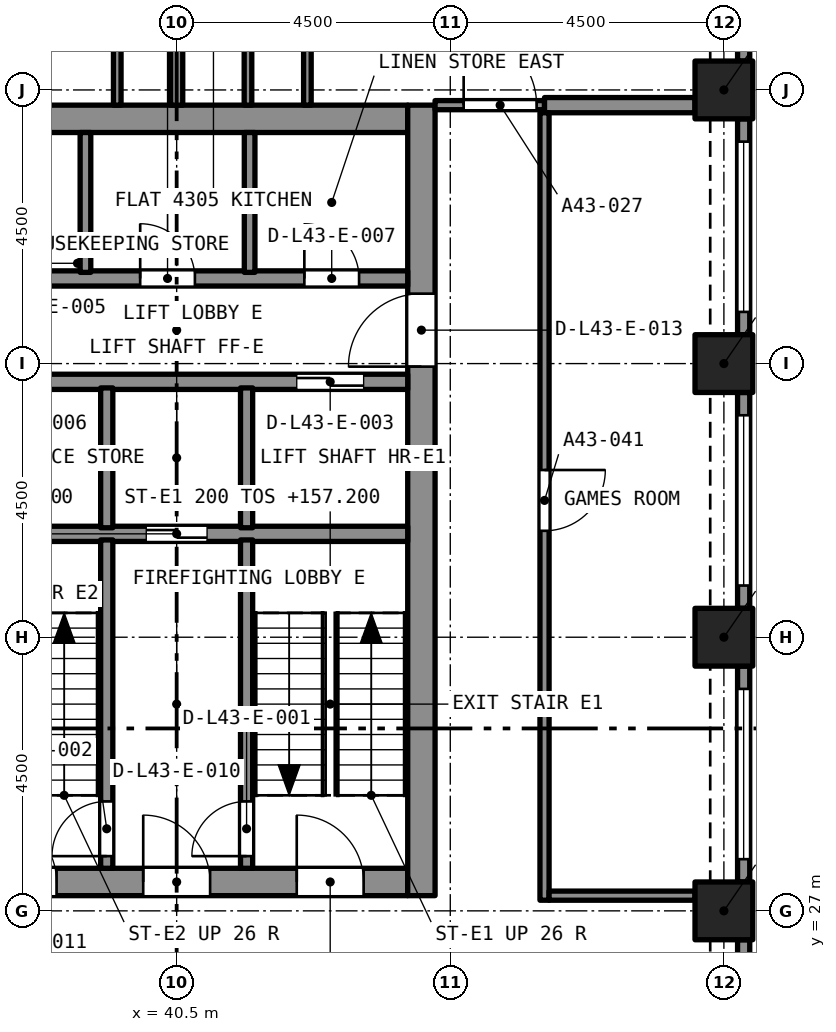
"""IFC4 building model, lengths in metres.
Left out: names, types, materials, properties, quantities, classifications, styles, units other than length and angle.
Written with IfcOpenShell. Run it as: python <this file> out.ifc"""

import sys

from ifc_helpers import new_model, si_unit, direction, frame, frame_2d, origin, origin_2d, place, context, subcontext, project, spatial, rectangle, extrude, element, fill, save


model = new_model("IFC4")
c1 = context("Model", 3, precision=1e-05, world=origin(), true_north=direction((0.0, 1.0)))
c2 = subcontext(c1, "Body", "Model", "MODEL_VIEW")
j1 = project(units=[si_unit("LENGTHUNIT", "METRE"), si_unit("PLANEANGLEUNIT", "RADIAN")], contexts=[c1])
p1 = place(None, origin())
s1 = spatial("IfcSite", under=j1, at=p1, CompositionType="ELEMENT")
p2 = place(p1, origin())
s2 = spatial("IfcBuilding", under=s1, at=p2, CompositionType="ELEMENT")
p3 = place(p2, frame((0.0, 0.0, 155.0)))
s3 = spatial("IfcBuildingStorey", under=s2, at=p3, CompositionType="ELEMENT", Elevation=155.0)
for number, where, z_axis, x_axis in (
    (1, (49.5, 27.0, 0.0), (0.0, 0.0, 1.0), (1.0, 0.0, 0.0)),
    (2, (49.5, 31.5, 0.0), (0.0, 0.0, 1.0), (1.0, 0.0, 0.0)),
    (3, (49.5, 36.0, 0.0), (0.0, 0.0, 1.0), (1.0, 0.0, 0.0)),
    (4, (49.5, 40.5, 0.0), (0.0, 0.0, 1.0), (1.0, 0.0, 0.0)),
):
    element("IfcColumn", number, at=place(p3, frame(where, z_axis=z_axis, x_axis=x_axis)), inside=s3, PredefinedType="COLUMN", context=c2, shape_type="SweptSolid", body=[
        extrude(rectangle(XDim=0.95, YDim=0.95, at=origin_2d()), origin(), (0.0, 0.0, 1.0), 4.4),
    ])
p4 = place(p3, frame((36.7, 27.475, 0.0), z_axis=(0.0, 0.0, 1.0), x_axis=(1.0, 0.0, 0.0)))
e5 = element("IfcWall", 5, at=p4, inside=s3, PredefinedType="SOLIDWALL", context=c2, shape_type="SweptSolid", body=[
    extrude(rectangle(XDim=7.6, YDim=0.45, at=frame_2d((3.8, 0.0))), origin(), (0.0, 0.0, 1.0), 4.4),
])
p5 = place(p4, frame((5.775, 0.0, 0.0)))
e6 = element("IfcOpeningElement", 6, at=p5, cuts=e5, PredefinedType="OPENING", context=c2, shape_type="SweptSolid", body=[
    extrude(rectangle(XDim=1.1, YDim=2.1, at=frame_2d((0.55, 1.05))), frame((0.0, 0.235, 0.0), z_axis=(0.0, -1.0, 0.0), x_axis=(1.0, 0.0, 0.0)), (0.0, 0.0, 1.0), 0.47),
])
p6 = place(p4, frame((3.25, 0.0, 0.0)))
e7 = element("IfcOpeningElement", 7, at=p6, cuts=e5, PredefinedType="OPENING", context=c2, shape_type="SweptSolid", body=[
    extrude(rectangle(XDim=1.1, YDim=2.1, at=frame_2d((0.55, 1.05))), frame((0.0, 0.235, 0.0), z_axis=(0.0, -1.0, 0.0), x_axis=(1.0, 0.0, 0.0)), (0.0, 0.0, 1.0), 0.47),
])
p7 = place(p4, frame((0.725, 0.0, 0.0)))
e8 = element("IfcOpeningElement", 8, at=p7, cuts=e5, PredefinedType="OPENING", context=c2, shape_type="SweptSolid", body=[
    extrude(rectangle(XDim=1.1, YDim=2.1, at=frame_2d((0.55, 1.05))), frame((0.0, 0.235, 0.0), z_axis=(0.0, -1.0, 0.0), x_axis=(1.0, 0.0, 0.0)), (0.0, 0.0, 1.0), 0.47),
])
p8 = place(p3, frame((36.7, 40.025, 0.0), z_axis=(0.0, 0.0, 1.0), x_axis=(1.0, 0.0, 0.0)))
e9 = element("IfcWall", 9, at=p8, inside=s3, PredefinedType="SOLIDWALL", context=c2, shape_type="SweptSolid", body=[
    extrude(rectangle(XDim=7.6, YDim=0.45, at=frame_2d((3.8, 0.0))), origin(), (0.0, 0.0, 1.0), 4.4),
])
p9 = place(p3, frame((44.525, 27.25, 0.0), z_axis=(0.0, 0.0, 1.0), x_axis=(0.0, 1.0, 0.0)))
e10 = element("IfcWall", 10, at=p9, inside=s3, PredefinedType="SOLIDWALL", context=c2, shape_type="SweptSolid", body=[
    extrude(rectangle(XDim=13.0, YDim=0.45, at=frame_2d((6.5, 0.0))), origin(), (0.0, 0.0, 1.0), 4.4),
])
p10 = place(p9, frame((8.7, 0.0, 0.0)))
e11 = element("IfcOpeningElement", 11, at=p10, cuts=e10, PredefinedType="OPENING", context=c2, shape_type="SweptSolid", body=[
    extrude(rectangle(XDim=1.2, YDim=2.1, at=frame_2d((0.6, 1.05))), frame((0.0, 0.235, 0.0), z_axis=(0.0, -1.0, 0.0), x_axis=(1.0, 0.0, 0.0)), (0.0, 0.0, 1.0), 0.47),
])
p11 = place(p3, frame((49.825, 26.525, 0.0), z_axis=(0.0, 0.0, 1.0), x_axis=(0.0, -1.0, 0.0)))
e12 = element("IfcWall", 12, at=p11, inside=s3, PredefinedType="SOLIDWALL", context=c2, shape_type="SweptSolid", body=[
    extrude(rectangle(XDim=3.55, YDim=0.2, at=frame_2d((1.775, 0.0))), origin(), (0.0, 0.0, 1.0), 4.4),
])
p12 = place(p11, frame((0.375, 0.0, 0.45)))
e13 = element("IfcOpeningElement", 13, at=p12, cuts=e12, PredefinedType="OPENING", context=c2, shape_type="SweptSolid", body=[
    extrude(rectangle(XDim=2.8, YDim=2.55, at=frame_2d((1.4, 1.275))), frame((0.0, 0.11, 0.0), z_axis=(0.0, -1.0, 0.0), x_axis=(1.0, 0.0, 0.0)), (0.0, 0.0, 1.0), 0.22),
])
p13 = place(p3, frame((49.825, 31.025, 0.0), z_axis=(0.0, 0.0, 1.0), x_axis=(0.0, -1.0, 0.0)))
e14 = element("IfcWall", 14, at=p13, inside=s3, PredefinedType="SOLIDWALL", context=c2, shape_type="SweptSolid", body=[
    extrude(rectangle(XDim=3.55, YDim=0.2, at=frame_2d((1.775, 0.0))), origin(), (0.0, 0.0, 1.0), 4.4),
])
p14 = place(p13, frame((0.375, 0.0, 0.45)))
e15 = element("IfcOpeningElement", 15, at=p14, cuts=e14, PredefinedType="OPENING", context=c2, shape_type="SweptSolid", body=[
    extrude(rectangle(XDim=2.8, YDim=2.55, at=frame_2d((1.4, 1.275))), frame((0.0, 0.11, 0.0), z_axis=(0.0, -1.0, 0.0), x_axis=(1.0, 0.0, 0.0)), (0.0, 0.0, 1.0), 0.22),
])
p15 = place(p3, frame((49.825, 35.525, 0.0), z_axis=(0.0, 0.0, 1.0), x_axis=(0.0, -1.0, 0.0)))
e16 = element("IfcWall", 16, at=p15, inside=s3, PredefinedType="SOLIDWALL", context=c2, shape_type="SweptSolid", body=[
    extrude(rectangle(XDim=3.55, YDim=0.2, at=frame_2d((1.775, 0.0))), origin(), (0.0, 0.0, 1.0), 4.4),
])
p16 = place(p15, frame((0.375, 0.0, 0.45)))
e17 = element("IfcOpeningElement", 17, at=p16, cuts=e16, PredefinedType="OPENING", context=c2, shape_type="SweptSolid", body=[
    extrude(rectangle(XDim=2.8, YDim=2.55, at=frame_2d((1.4, 1.275))), frame((0.0, 0.11, 0.0), z_axis=(0.0, -1.0, 0.0), x_axis=(1.0, 0.0, 0.0)), (0.0, 0.0, 1.0), 0.22),
])
p17 = place(p3, frame((49.825, 40.025, 0.0), z_axis=(0.0, 0.0, 1.0), x_axis=(0.0, -1.0, 0.0)))
e18 = element("IfcWall", 18, at=p17, inside=s3, PredefinedType="SOLIDWALL", context=c2, shape_type="SweptSolid", body=[
    extrude(rectangle(XDim=3.55, YDim=0.2, at=frame_2d((1.775, 0.0))), origin(), (0.0, 0.0, 1.0), 4.4),
])
p18 = place(p17, frame((0.375, 0.0, 0.45)))
e19 = element("IfcOpeningElement", 19, at=p18, cuts=e18, PredefinedType="OPENING", context=c2, shape_type="SweptSolid", body=[
    extrude(rectangle(XDim=2.8, YDim=2.55, at=frame_2d((1.4, 1.275))), frame((0.0, 0.11, 0.0), z_axis=(0.0, -1.0, 0.0), x_axis=(1.0, 0.0, 0.0)), (0.0, 0.0, 1.0), 0.22),
])
p19 = place(p3, frame((49.825, 44.525, 0.0), z_axis=(0.0, 0.0, 1.0), x_axis=(0.0, -1.0, 0.0)))
e20 = element("IfcWall", 20, at=p19, inside=s3, PredefinedType="SOLIDWALL", context=c2, shape_type="SweptSolid", body=[
    extrude(rectangle(XDim=3.55, YDim=0.2, at=frame_2d((1.775, 0.0))), origin(), (0.0, 0.0, 1.0), 4.4),
])
p20 = place(p19, frame((0.375, 0.0, 0.45)))
e21 = element("IfcOpeningElement", 21, at=p20, cuts=e20, PredefinedType="OPENING", context=c2, shape_type="SweptSolid", body=[
    extrude(rectangle(XDim=2.8, YDim=2.55, at=frame_2d((1.4, 1.275))), frame((0.0, 0.11, 0.0), z_axis=(0.0, -1.0, 0.0), x_axis=(1.0, 0.0, 0.0)), (0.0, 0.0, 1.0), 0.22),
])
p21 = place(p3, frame((42.65, 40.25, 0.0), z_axis=(0.0, 0.0, 1.0), x_axis=(0.0, 1.0, 0.0)))
e22 = element("IfcWall", 22, at=p21, inside=s3, PredefinedType="PARTITIONING", context=c2, shape_type="SweptSolid", body=[
    extrude(rectangle(XDim=3.472, YDim=0.125, at=frame_2d((1.736, 0.0))), origin(), (0.0, 0.0, 1.0), 4.1),
])
p22 = place(p21, frame((2.49, 0.0, 0.0)))
e23 = element("IfcOpeningElement", 23, at=p22, cuts=e22, PredefinedType="OPENING", context=c2, shape_type="SweptSolid", body=[
    extrude(rectangle(XDim=0.8, YDim=2.1, at=frame_2d((0.4, 1.05))), frame((0.0, 0.073, 0.0), z_axis=(0.0, -1.0, 0.0), x_axis=(1.0, 0.0, 0.0)), (0.0, 0.0, 1.0), 0.145),
])
p23 = place(p3, frame((41.673, 40.25, 0.0), z_axis=(0.0, 0.0, 1.0), x_axis=(0.0, 1.0, 0.0)))
e24 = element("IfcWall", 24, at=p23, inside=s3, PredefinedType="PARTITIONING", context=c2, shape_type="SweptSolid", body=[
    extrude(rectangle(XDim=3.347, YDim=0.125, at=frame_2d((1.674, 0.0))), origin(), (0.0, 0.0, 1.0), 4.1),
])
p24 = place(p3, frame((44.75, 40.25, 0.0), z_axis=(0.0, 0.0, 1.0), x_axis=(1.0, 0.0, 0.0)))
e25 = element("IfcWall", 25, at=p24, inside=s3, PredefinedType="PARTITIONING", context=c2, shape_type="SweptSolid", body=[
    extrude(rectangle(XDim=1.8, YDim=0.15, at=frame_2d((0.9, 0.0))), origin(), (0.0, 0.0, 1.0), 4.1),
])
p25 = place(p24, frame((0.47, 0.0, 0.0)))
e26 = element("IfcOpeningElement", 26, at=p25, cuts=e25, PredefinedType="OPENING", context=c2, shape_type="SweptSolid", body=[
    extrude(rectangle(XDim=1.2, YDim=2.4, at=frame_2d((0.6, 1.2))), frame((0.0, 0.085, 0.0), z_axis=(0.0, -1.0, 0.0), x_axis=(1.0, 0.0, 0.0)), (0.0, 0.0, 1.0), 0.17),
])
p26 = place(p3, frame((46.55, 40.25, 0.0), z_axis=(0.0, 0.0, 1.0), x_axis=(1.0, 0.0, 0.0)))
e27 = element("IfcWall", 27, at=p26, inside=s3, PredefinedType="PARTITIONING", context=c2, shape_type="SweptSolid", body=[
    extrude(rectangle(XDim=2.475, YDim=0.25, at=frame_2d((1.237, 0.0))), origin(), (0.0, 0.0, 1.0), 4.1),
])
p27 = place(p3, frame((40.5, 40.25, 0.0), z_axis=(0.0, 0.0, 1.0), x_axis=(0.0, 1.0, 0.0)))
e28 = element("IfcWall", 28, at=p27, inside=s3, PredefinedType="PARTITIONING", context=c2, shape_type="SweptSolid", body=[
    extrude(rectangle(XDim=3.37, YDim=0.2, at=frame_2d((1.685, 0.0))), origin(), (0.0, 0.0, 1.0), 4.1),
])
p28 = place(p3, frame((39.523, 40.25, 0.0), z_axis=(0.0, 0.0, 1.0), x_axis=(0.0, 1.0, 0.0)))
e29 = element("IfcWall", 29, at=p28, inside=s3, PredefinedType="PARTITIONING", context=c2, shape_type="SweptSolid", body=[
    extrude(rectangle(XDim=3.308, YDim=0.125, at=frame_2d((1.654, 0.0))), origin(), (0.0, 0.0, 1.0), 4.1),
])
p29 = place(p3, frame((46.55, 40.125, 0.0), z_axis=(0.0, 0.0, 1.0), x_axis=(0.0, -1.0, 0.0)))
e30 = element("IfcWall", 30, at=p29, inside=s3, PredefinedType="PARTITIONING", context=c2, shape_type="SweptSolid", body=[
    extrude(rectangle(XDim=12.95, YDim=0.15, at=frame_2d((6.475, 0.0))), origin(), (0.0, 0.0, 1.0), 4.1),
])
p30 = place(p29, frame((5.875, 0.0, 0.0)))
e31 = element("IfcOpeningElement", 31, at=p30, cuts=e30, PredefinedType="OPENING", context=c2, shape_type="SweptSolid", body=[
    extrude(rectangle(XDim=1.0, YDim=2.1, at=frame_2d((0.5, 1.05))), frame((0.0, 0.085, 0.0), z_axis=(0.0, -1.0, 0.0), x_axis=(1.0, 0.0, 0.0)), (0.0, 0.0, 1.0), 0.17),
])
p31 = place(p3, frame((46.625, 27.25, 0.0), z_axis=(0.0, 0.0, 1.0), x_axis=(1.0, 0.0, 0.0)))
e32 = element("IfcWall", 32, at=p31, inside=s3, PredefinedType="PARTITIONING", context=c2, shape_type="SweptSolid", body=[
    extrude(rectangle(XDim=2.4, YDim=0.15, at=frame_2d((1.2, 0.0))), origin(), (0.0, 0.0, 1.0), 4.1),
])
p32 = place(p3, frame((36.7, 33.2, 0.0), z_axis=(0.0, 0.0, 1.0), x_axis=(1.0, 0.0, 0.0)))
e33 = element("IfcWall", 33, at=p32, inside=s3, PredefinedType="SOLIDWALL", context=c2, shape_type="SweptSolid", body=[
    extrude(rectangle(XDim=7.6, YDim=0.25, at=frame_2d((3.8, 0.0))), origin(), (0.0, 0.0, 1.0), 4.1),
])
p33 = place(p32, frame((3.3, 0.0, 0.0)))
e34 = element("IfcOpeningElement", 34, at=p33, cuts=e33, PredefinedType="OPENING", context=c2, shape_type="SweptSolid", body=[
    extrude(rectangle(XDim=1.0, YDim=2.1, at=frame_2d((0.5, 1.05))), frame((0.0, 0.135, 0.0), z_axis=(0.0, -1.0, 0.0), x_axis=(1.0, 0.0, 0.0)), (0.0, 0.0, 1.0), 0.27),
])
p34 = place(p3, frame((36.7, 35.7, 0.0), z_axis=(0.0, 0.0, 1.0), x_axis=(1.0, 0.0, 0.0)))
e35 = element("IfcWall", 35, at=p34, inside=s3, PredefinedType="SOLIDWALL", context=c2, shape_type="SweptSolid", body=[
    extrude(rectangle(XDim=7.6, YDim=0.25, at=frame_2d((3.8, 0.0))), origin(), (0.0, 0.0, 1.0), 4.1),
])
p35 = place(p34, frame((5.775, 0.0, 0.0)))
e36 = element("IfcOpeningElement", 36, at=p35, cuts=e35, PredefinedType="OPENING", context=c2, shape_type="SweptSolid", body=[
    extrude(rectangle(XDim=1.1, YDim=2.4, at=frame_2d((0.55, 1.2))), frame((0.0, 0.135, 0.0), z_axis=(0.0, -1.0, 0.0), x_axis=(1.0, 0.0, 0.0)), (0.0, 0.0, 1.0), 0.27),
])
p36 = place(p34, frame((0.825, 0.0, 0.0)))
e37 = element("IfcOpeningElement", 37, at=p36, cuts=e35, PredefinedType="OPENING", context=c2, shape_type="SweptSolid", body=[
    extrude(rectangle(XDim=0.9, YDim=2.1, at=frame_2d((0.45, 1.05))), frame((0.0, 0.135, 0.0), z_axis=(0.0, -1.0, 0.0), x_axis=(1.0, 0.0, 0.0)), (0.0, 0.0, 1.0), 0.27),
])
p37 = place(p3, frame((36.7, 37.4, 0.0), z_axis=(0.0, 0.0, 1.0), x_axis=(1.0, 0.0, 0.0)))
e38 = element("IfcWall", 38, at=p37, inside=s3, PredefinedType="SOLIDWALL", context=c2, shape_type="SweptSolid", body=[
    extrude(rectangle(XDim=7.6, YDim=0.25, at=frame_2d((3.8, 0.0))), origin(), (0.0, 0.0, 1.0), 4.1),
])
p38 = place(p37, frame((0.75, 0.0, 0.0)))
e39 = element("IfcOpeningElement", 39, at=p38, cuts=e38, PredefinedType="OPENING", context=c2, shape_type="SweptSolid", body=[
    extrude(rectangle(XDim=0.7, YDim=2.1, at=frame_2d((0.35, 1.05))), frame((0.0, 0.135, 0.0), z_axis=(0.0, -1.0, 0.0), x_axis=(1.0, 0.0, 0.0)), (0.0, 0.0, 1.0), 0.27),
])
p39 = place(p37, frame((5.9, 0.0, 0.0)))
e40 = element("IfcOpeningElement", 40, at=p39, cuts=e38, PredefinedType="OPENING", context=c2, shape_type="SweptSolid", body=[
    extrude(rectangle(XDim=0.9, YDim=2.1, at=frame_2d((0.45, 1.05))), frame((0.0, 0.135, 0.0), z_axis=(0.0, -1.0, 0.0), x_axis=(1.0, 0.0, 0.0)), (0.0, 0.0, 1.0), 0.27),
])
p40 = place(p37, frame((3.2, 0.0, 0.0)))
e41 = element("IfcOpeningElement", 41, at=p40, cuts=e38, PredefinedType="OPENING", context=c2, shape_type="SweptSolid", body=[
    extrude(rectangle(XDim=0.9, YDim=2.1, at=frame_2d((0.45, 1.05))), frame((0.0, 0.135, 0.0), z_axis=(0.0, -1.0, 0.0), x_axis=(1.0, 0.0, 0.0)), (0.0, 0.0, 1.0), 0.27),
])
p41 = place(p3, frame((41.65, 27.7, 0.0), z_axis=(0.0, 0.0, 1.0), x_axis=(0.0, 1.0, 0.0)))
e42 = element("IfcWall", 42, at=p41, inside=s3, PredefinedType="SOLIDWALL", context=c2, shape_type="SweptSolid", body=[
    extrude(rectangle(XDim=5.4, YDim=0.2, at=frame_2d((2.7, 0.0))), origin(), (0.0, 0.0, 1.0), 4.1),
])
p42 = place(p41, frame((0.2, 0.0, 0.0)))
e43 = element("IfcOpeningElement", 43, at=p42, cuts=e42, PredefinedType="OPENING", context=c2, shape_type="SweptSolid", body=[
    extrude(rectangle(XDim=0.9, YDim=2.1, at=frame_2d((0.45, 1.05))), frame((0.0, 0.11, 0.0), z_axis=(0.0, -1.0, 0.0), x_axis=(1.0, 0.0, 0.0)), (0.0, 0.0, 1.0), 0.22),
])
p43 = place(p3, frame((39.35, 27.7, 0.0), z_axis=(0.0, 0.0, 1.0), x_axis=(0.0, 1.0, 0.0)))
e44 = element("IfcWall", 44, at=p43, inside=s3, PredefinedType="SOLIDWALL", context=c2, shape_type="SweptSolid", body=[
    extrude(rectangle(XDim=5.4, YDim=0.2, at=frame_2d((2.7, 0.0))), origin(), (0.0, 0.0, 1.0), 4.1),
])
p44 = place(p43, frame((0.2, 0.0, 0.0)))
e45 = element("IfcOpeningElement", 45, at=p44, cuts=e44, PredefinedType="OPENING", context=c2, shape_type="SweptSolid", body=[
    extrude(rectangle(XDim=0.9, YDim=2.1, at=frame_2d((0.45, 1.05))), frame((0.0, 0.11, 0.0), z_axis=(0.0, -1.0, 0.0), x_axis=(1.0, 0.0, 0.0)), (0.0, 0.0, 1.0), 0.22),
])
for number, where, z_axis, x_axis in (
    (46, (41.65, 33.3, 0.0), (0.0, 0.0, 1.0), (0.0, 1.0, 0.0)),
    (47, (39.35, 33.3, 0.0), (0.0, 0.0, 1.0), (0.0, 1.0, 0.0)),
):
    element("IfcWall", number, at=place(p3, frame(where, z_axis=z_axis, x_axis=x_axis)), inside=s3, PredefinedType="SOLIDWALL", context=c2, shape_type="SweptSolid", body=[
        extrude(rectangle(XDim=2.3, YDim=0.2, at=frame_2d((1.15, 0.0))), origin(), (0.0, 0.0, 1.0), 4.1),
    ])
for number, where, z_axis, x_axis in (
    (48, (41.7, 37.5, 0.0), (0.0, 0.0, 1.0), (0.0, 1.0, 0.0)),
    (49, (39.0, 37.5, 0.0), (0.0, 0.0, 1.0), (0.0, 1.0, 0.0)),
):
    element("IfcWall", number, at=place(p3, frame(where, z_axis=z_axis, x_axis=x_axis)), inside=s3, PredefinedType="SOLIDWALL", context=c2, shape_type="SweptSolid", body=[
        extrude(rectangle(XDim=2.3, YDim=0.175, at=frame_2d((1.15, 0.0))), origin(), (0.0, 0.0, 1.0), 4.1),
    ])
p45 = place(p14, origin())
e50 = element("IfcWindow", 50, at=p45, inside=s3, PartitioningType="SINGLE_PANEL", PredefinedType="WINDOW", context=c2, shape_type="SweptSolid", body=[
    extrude(rectangle(XDim=2.8, YDim=2.55, at=frame_2d((1.4, 1.275))), frame((0.0, 0.03, 0.0), z_axis=(0.0, -1.0, 0.0), x_axis=(1.0, 0.0, 0.0)), (0.0, 0.0, 1.0), 0.06),
])
fill(e15, e50)
p46 = place(p16, origin())
e51 = element("IfcWindow", 51, at=p46, inside=s3, PartitioningType="SINGLE_PANEL", PredefinedType="WINDOW", context=c2, shape_type="SweptSolid", body=[
    extrude(rectangle(XDim=2.8, YDim=2.55, at=frame_2d((1.4, 1.275))), frame((0.0, 0.03, 0.0), z_axis=(0.0, -1.0, 0.0), x_axis=(1.0, 0.0, 0.0)), (0.0, 0.0, 1.0), 0.06),
])
fill(e17, e51)
p47 = place(p18, origin())
e52 = element("IfcWindow", 52, at=p47, inside=s3, PartitioningType="SINGLE_PANEL", PredefinedType="WINDOW", context=c2, shape_type="SweptSolid", body=[
    extrude(rectangle(XDim=2.8, YDim=2.55, at=frame_2d((1.4, 1.275))), frame((0.0, 0.03, 0.0), z_axis=(0.0, -1.0, 0.0), x_axis=(1.0, 0.0, 0.0)), (0.0, 0.0, 1.0), 0.06),
])
fill(e19, e52)
p48 = place(p25, origin())
e53 = element("IfcDoor", 53, at=p48, inside=s3, OperationType="SINGLE_SWING_RIGHT", PredefinedType="DOOR", context=c2, shape_type="SweptSolid", body=[
    extrude(rectangle(XDim=1.2, YDim=2.4, at=frame_2d((0.6, 1.2))), frame((0.0, 0.025, 0.0), z_axis=(0.0, -1.0, 0.0), x_axis=(1.0, 0.0, 0.0)), (0.0, 0.0, 1.0), 0.05),
])
fill(e26, e53)
p49 = place(p30, origin())
e54 = element("IfcDoor", 54, at=p49, inside=s3, OperationType="SINGLE_SWING_LEFT", PredefinedType="DOOR", context=c2, shape_type="SweptSolid", body=[
    extrude(rectangle(XDim=1.0, YDim=2.1, at=frame_2d((0.5, 1.05))), frame((0.0, 0.025, 0.0), z_axis=(0.0, -1.0, 0.0), x_axis=(1.0, 0.0, 0.0)), (0.0, 0.0, 1.0), 0.05),
])
fill(e31, e54)
p50 = place(p42, origin())
e55 = element("IfcDoor", 55, at=p50, inside=s3, OperationType="SINGLE_SWING_LEFT", PredefinedType="DOOR", context=c2, shape_type="SweptSolid", body=[
    extrude(rectangle(XDim=0.9, YDim=2.1, at=frame_2d((0.45, 1.05))), frame((0.0, 0.025, 0.0), z_axis=(0.0, -1.0, 0.0), x_axis=(1.0, 0.0, 0.0)), (0.0, 0.0, 1.0), 0.05),
])
fill(e43, e55)
p51 = place(p44, origin())
e56 = element("IfcDoor", 56, at=p51, inside=s3, OperationType="SINGLE_SWING_LEFT", PredefinedType="DOOR", context=c2, shape_type="SweptSolid", body=[
    extrude(rectangle(XDim=0.9, YDim=2.1, at=frame_2d((0.45, 1.05))), frame((0.0, 0.025, 0.0), z_axis=(0.0, -1.0, 0.0), x_axis=(1.0, 0.0, 0.0)), (0.0, 0.0, 1.0), 0.05),
])
fill(e45, e56)
p52 = place(p35, origin())
e57 = element("IfcDoor", 57, at=p52, inside=s3, OperationType="SLIDING_TO_LEFT", PredefinedType="DOOR", context=c2, shape_type="SweptSolid", body=[
    extrude(rectangle(XDim=1.1, YDim=2.4, at=frame_2d((0.55, 1.2))), frame((0.0, 0.025, 0.0), z_axis=(0.0, -1.0, 0.0), x_axis=(1.0, 0.0, 0.0)), (0.0, 0.0, 1.0), 0.05),
])
fill(e36, e57)
p53 = place(p33, origin())
e58 = element("IfcDoor", 58, at=p53, inside=s3, OperationType="SLIDING_TO_LEFT", PredefinedType="DOOR", context=c2, shape_type="SweptSolid", body=[
    extrude(rectangle(XDim=1.0, YDim=2.1, at=frame_2d((0.5, 1.05))), frame((0.0, 0.025, 0.0), z_axis=(0.0, -1.0, 0.0), x_axis=(1.0, 0.0, 0.0)), (0.0, 0.0, 1.0), 0.05),
])
fill(e34, e58)
p54 = place(p39, origin())
e59 = element("IfcDoor", 59, at=p54, inside=s3, OperationType="SINGLE_SWING_LEFT", PredefinedType="DOOR", context=c2, shape_type="SweptSolid", body=[
    extrude(rectangle(XDim=0.9, YDim=2.1, at=frame_2d((0.45, 1.05))), frame((0.0, 0.025, 0.0), z_axis=(0.0, -1.0, 0.0), x_axis=(1.0, 0.0, 0.0)), (0.0, 0.0, 1.0), 0.05),
])
fill(e40, e59)
p55 = place(p40, origin())
e60 = element("IfcDoor", 60, at=p55, inside=s3, OperationType="SINGLE_SWING_LEFT", PredefinedType="DOOR", context=c2, shape_type="SweptSolid", body=[
    extrude(rectangle(XDim=0.9, YDim=2.1, at=frame_2d((0.45, 1.05))), frame((0.0, 0.025, 0.0), z_axis=(0.0, -1.0, 0.0), x_axis=(1.0, 0.0, 0.0)), (0.0, 0.0, 1.0), 0.05),
])
fill(e41, e60)
p56 = place(p5, origin())
e61 = element("IfcDoor", 61, at=p56, inside=s3, OperationType="SINGLE_SWING_LEFT", PredefinedType="DOOR", context=c2, shape_type="SweptSolid", body=[
    extrude(rectangle(XDim=1.1, YDim=2.1, at=frame_2d((0.55, 1.05))), frame((0.0, 0.025, 0.0), z_axis=(0.0, -1.0, 0.0), x_axis=(1.0, 0.0, 0.0)), (0.0, 0.0, 1.0), 0.05),
])
fill(e6, e61)
p57 = place(p6, origin())
e62 = element("IfcDoor", 62, at=p57, inside=s3, OperationType="SINGLE_SWING_LEFT", PredefinedType="DOOR", context=c2, shape_type="SweptSolid", body=[
    extrude(rectangle(XDim=1.1, YDim=2.1, at=frame_2d((0.55, 1.05))), frame((0.0, 0.025, 0.0), z_axis=(0.0, -1.0, 0.0), x_axis=(1.0, 0.0, 0.0)), (0.0, 0.0, 1.0), 0.05),
])
fill(e7, e62)
p58 = place(p7, origin())
e63 = element("IfcDoor", 63, at=p58, inside=s3, OperationType="SINGLE_SWING_LEFT", PredefinedType="DOOR", context=c2, shape_type="SweptSolid", body=[
    extrude(rectangle(XDim=1.1, YDim=2.1, at=frame_2d((0.55, 1.05))), frame((0.0, 0.025, 0.0), z_axis=(0.0, -1.0, 0.0), x_axis=(1.0, 0.0, 0.0)), (0.0, 0.0, 1.0), 0.05),
])
fill(e8, e63)
p59 = place(p10, origin())
e64 = element("IfcDoor", 64, at=p59, inside=s3, OperationType="SINGLE_SWING_LEFT", PredefinedType="DOOR", context=c2, shape_type="SweptSolid", body=[
    extrude(rectangle(XDim=1.2, YDim=2.1, at=frame_2d((0.6, 1.05))), frame((0.0, 0.025, 0.0), z_axis=(0.0, -1.0, 0.0), x_axis=(1.0, 0.0, 0.0)), (0.0, 0.0, 1.0), 0.05),
])
fill(e11, e64)
save(model, sys.argv[1])
